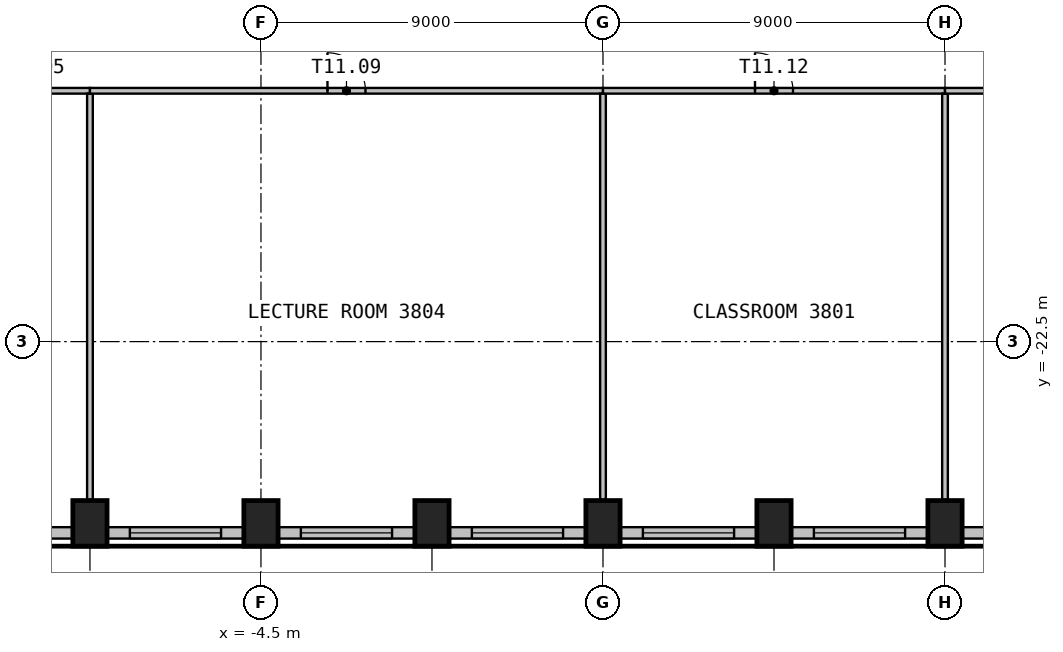
"""IFC4 building model, lengths in metres.
Left out: names, types, materials, properties, quantities, classifications, styles, units other than length and angle.
Written with IfcOpenShell. Run it as: python <this file> out.ifc"""

import sys

from ifc_helpers import new_model, si_unit, direction, frame, frame_2d, origin, origin_2d, place, context, subcontext, project, spatial, rectangle, extrude, element, fill, save


model = new_model("IFC4")
c1 = context("Model", 3, precision=1e-05, world=origin(), true_north=direction((0.0, 1.0)))
c2 = subcontext(c1, "Body", "Model", "MODEL_VIEW")
j1 = project(units=[si_unit("LENGTHUNIT", "METRE"), si_unit("PLANEANGLEUNIT", "RADIAN")], contexts=[c1])
p1 = place(None, origin())
s1 = spatial("IfcSite", under=j1, at=p1, CompositionType="ELEMENT")
p2 = place(p1, origin())
s2 = spatial("IfcBuilding", under=s1, at=p2, CompositionType="ELEMENT")
p3 = place(p2, frame((0.0, 0.0, 156.0)))
s3 = spatial("IfcBuildingStorey", under=s2, at=p3, CompositionType="ELEMENT", Elevation=156.0)
for number, where, z_axis, x_axis in (
    (1, (-9.0, -27.283, 0.0), (0.0, 0.0, 1.0), (1.0, 0.0, 0.0)),
    (2, (-4.5, -27.283, 0.0), (0.0, 0.0, 1.0), (1.0, 0.0, 0.0)),
    (3, (0.0, -27.283, 0.0), (0.0, 0.0, 1.0), (1.0, 0.0, 0.0)),
    (4, (4.5, -27.283, 0.0), (0.0, 0.0, 1.0), (1.0, 0.0, 0.0)),
    (5, (9.0, -27.283, 0.0), (0.0, 0.0, 1.0), (1.0, 0.0, 0.0)),
    (6, (13.5, -27.283, 0.0), (0.0, 0.0, 1.0), (1.0, 0.0, 0.0)),
):
    element("IfcColumn", number, at=place(p3, frame(where, z_axis=z_axis, x_axis=x_axis)), inside=s3, PredefinedType="COLUMN", context=c2, shape_type="SweptSolid", body=[
        extrude(rectangle(XDim=0.9, YDim=1.2, at=origin_2d()), origin(), (0.0, 0.0, 1.0), 3.575),
    ])
p4 = place(p3, frame((-13.05, -27.533, 0.0), z_axis=(0.0, 0.0, 1.0), x_axis=(1.0, 0.0, 0.0)))
e7 = element("IfcWall", 7, at=p4, inside=s3, PredefinedType="SOLIDWALL", context=c2, shape_type="SweptSolid", body=[
    extrude(rectangle(XDim=3.599, YDim=0.3, at=frame_2d((1.8, 0.0))), origin(), (0.0, 0.0, 1.0), 3.575),
])
p5 = place(p4, frame((0.6, 0.0, 0.9)))
e8 = element("IfcOpeningElement", 8, at=p5, cuts=e7, PredefinedType="OPENING", context=c2, shape_type="SweptSolid", body=[
    extrude(rectangle(XDim=2.4, YDim=2.1, at=frame_2d((1.2, 1.05))), frame((0.0, 0.16, 0.0), z_axis=(0.0, -1.0, 0.0), x_axis=(1.0, 0.0, 0.0)), (0.0, 0.0, 1.0), 0.32),
])
p6 = place(p3, frame((-8.55, -27.533, 0.0), z_axis=(0.0, 0.0, 1.0), x_axis=(1.0, 0.0, 0.0)))
e9 = element("IfcWall", 9, at=p6, inside=s3, PredefinedType="SOLIDWALL", context=c2, shape_type="SweptSolid", body=[
    extrude(rectangle(XDim=3.599, YDim=0.3, at=frame_2d((1.8, 0.0))), origin(), (0.0, 0.0, 1.0), 3.575),
])
p7 = place(p6, frame((0.6, 0.0, 0.9)))
e10 = element("IfcOpeningElement", 10, at=p7, cuts=e9, PredefinedType="OPENING", context=c2, shape_type="SweptSolid", body=[
    extrude(rectangle(XDim=2.4, YDim=2.1, at=frame_2d((1.2, 1.05))), frame((0.0, 0.16, 0.0), z_axis=(0.0, -1.0, 0.0), x_axis=(1.0, 0.0, 0.0)), (0.0, 0.0, 1.0), 0.32),
])
p8 = place(p3, frame((-4.05, -27.533, 0.0), z_axis=(0.0, 0.0, 1.0), x_axis=(1.0, 0.0, 0.0)))
e11 = element("IfcWall", 11, at=p8, inside=s3, PredefinedType="SOLIDWALL", context=c2, shape_type="SweptSolid", body=[
    extrude(rectangle(XDim=3.599, YDim=0.3, at=frame_2d((1.8, 0.0))), origin(), (0.0, 0.0, 1.0), 3.575),
])
p9 = place(p8, frame((0.6, 0.0, 0.9)))
e12 = element("IfcOpeningElement", 12, at=p9, cuts=e11, PredefinedType="OPENING", context=c2, shape_type="SweptSolid", body=[
    extrude(rectangle(XDim=2.4, YDim=2.1, at=frame_2d((1.2, 1.05))), frame((0.0, 0.16, 0.0), z_axis=(0.0, -1.0, 0.0), x_axis=(1.0, 0.0, 0.0)), (0.0, 0.0, 1.0), 0.32),
])
p10 = place(p3, frame((0.45, -27.533, 0.0), z_axis=(0.0, 0.0, 1.0), x_axis=(1.0, 0.0, 0.0)))
e13 = element("IfcWall", 13, at=p10, inside=s3, PredefinedType="SOLIDWALL", context=c2, shape_type="SweptSolid", body=[
    extrude(rectangle(XDim=3.599, YDim=0.3, at=frame_2d((1.8, 0.0))), origin(), (0.0, 0.0, 1.0), 3.575),
])
p11 = place(p10, frame((0.6, 0.0, 0.9)))
e14 = element("IfcOpeningElement", 14, at=p11, cuts=e13, PredefinedType="OPENING", context=c2, shape_type="SweptSolid", body=[
    extrude(rectangle(XDim=2.4, YDim=2.1, at=frame_2d((1.2, 1.05))), frame((0.0, 0.16, 0.0), z_axis=(0.0, -1.0, 0.0), x_axis=(1.0, 0.0, 0.0)), (0.0, 0.0, 1.0), 0.32),
])
p12 = place(p3, frame((4.95, -27.533, 0.0), z_axis=(0.0, 0.0, 1.0), x_axis=(1.0, 0.0, 0.0)))
e15 = element("IfcWall", 15, at=p12, inside=s3, PredefinedType="SOLIDWALL", context=c2, shape_type="SweptSolid", body=[
    extrude(rectangle(XDim=3.599, YDim=0.3, at=frame_2d((1.8, 0.0))), origin(), (0.0, 0.0, 1.0), 3.575),
])
p13 = place(p12, frame((0.6, 0.0, 0.9)))
e16 = element("IfcOpeningElement", 16, at=p13, cuts=e15, PredefinedType="OPENING", context=c2, shape_type="SweptSolid", body=[
    extrude(rectangle(XDim=2.4, YDim=2.1, at=frame_2d((1.2, 1.05))), frame((0.0, 0.16, 0.0), z_axis=(0.0, -1.0, 0.0), x_axis=(1.0, 0.0, 0.0)), (0.0, 0.0, 1.0), 0.32),
])
p14 = place(p3, frame((9.45, -27.533, 0.0), z_axis=(0.0, 0.0, 1.0), x_axis=(1.0, 0.0, 0.0)))
e17 = element("IfcWall", 17, at=p14, inside=s3, PredefinedType="SOLIDWALL", context=c2, shape_type="SweptSolid", body=[
    extrude(rectangle(XDim=3.599, YDim=0.3, at=frame_2d((1.8, 0.0))), origin(), (0.0, 0.0, 1.0), 3.575),
])
p15 = place(p14, frame((0.6, 0.0, 0.9)))
e18 = element("IfcOpeningElement", 18, at=p15, cuts=e17, PredefinedType="OPENING", context=c2, shape_type="SweptSolid", body=[
    extrude(rectangle(XDim=2.4, YDim=2.1, at=frame_2d((1.2, 1.05))), frame((0.0, 0.16, 0.0), z_axis=(0.0, -1.0, 0.0), x_axis=(1.0, 0.0, 0.0)), (0.0, 0.0, 1.0), 0.32),
])
p16 = place(p3, frame((13.95, -27.533, 0.0), z_axis=(0.0, 0.0, 1.0), x_axis=(1.0, 0.0, 0.0)))
e19 = element("IfcWall", 19, at=p16, inside=s3, PredefinedType="SOLIDWALL", context=c2, shape_type="SweptSolid", body=[
    extrude(rectangle(XDim=3.294, YDim=0.3, at=frame_2d((1.647, 0.0))), origin(), (0.0, 0.0, 1.0), 3.575),
])
p17 = place(p16, frame((0.6, 0.0, 0.9)))
e20 = element("IfcOpeningElement", 20, at=p17, cuts=e19, PredefinedType="OPENING", context=c2, shape_type="SweptSolid", body=[
    extrude(rectangle(XDim=2.4, YDim=2.1, at=frame_2d((1.2, 1.05))), frame((0.0, 0.16, 0.0), z_axis=(0.0, -1.0, 0.0), x_axis=(1.0, 0.0, 0.0)), (0.0, 0.0, 1.0), 0.32),
])
p18 = place(p3, frame((-12.164, -15.9, 0.0), z_axis=(0.0, 0.0, 1.0), x_axis=(1.0, 0.0, 0.0)))
e21 = element("IfcWall", 21, at=p18, inside=s3, PredefinedType="PARTITIONING", context=c2, shape_type="SweptSolid", body=[
    extrude(rectangle(XDim=3.164, YDim=0.15, at=frame_2d((1.582, 0.0))), origin(), (0.0, 0.0, 1.0), 3.575),
])
p19 = place(p18, frame((1.082, 0.0, 0.0)))
e22 = element("IfcOpeningElement", 22, at=p19, cuts=e21, PredefinedType="OPENING", context=c2, shape_type="SweptSolid", body=[
    extrude(rectangle(XDim=1.0, YDim=2.1, at=frame_2d((0.5, 1.05))), frame((0.0, 0.085, 0.0), z_axis=(0.0, -1.0, 0.0), x_axis=(1.0, 0.0, 0.0)), (0.0, 0.0, 1.0), 0.17),
])
p20 = place(p3, frame((-9.0, -15.975, 0.0), z_axis=(0.0, 0.0, 1.0), x_axis=(0.0, -1.0, 0.0)))
e23 = element("IfcWall", 23, at=p20, inside=s3, PredefinedType="MOVABLE", context=c2, shape_type="SweptSolid", body=[
    extrude(rectangle(XDim=10.688, YDim=0.15, at=frame_2d((5.344, 0.0))), origin(), (0.0, 0.0, 1.0), 3.575),
])
p21 = place(p3, frame((-9.0, -15.9, 0.0), z_axis=(0.0, 0.0, 1.0), x_axis=(1.0, 0.0, 0.0)))
e24 = element("IfcWall", 24, at=p21, inside=s3, PredefinedType="PARTITIONING", context=c2, shape_type="SweptSolid", body=[
    extrude(rectangle(XDim=13.5, YDim=0.15, at=frame_2d((6.75, 0.0))), origin(), (0.0, 0.0, 1.0), 3.575),
])
p22 = place(p21, frame((6.25, 0.0, 0.0)))
e25 = element("IfcOpeningElement", 25, at=p22, cuts=e24, PredefinedType="OPENING", context=c2, shape_type="SweptSolid", body=[
    extrude(rectangle(XDim=1.0, YDim=2.1, at=frame_2d((0.5, 1.05))), frame((0.0, 0.085, 0.0), z_axis=(0.0, -1.0, 0.0), x_axis=(1.0, 0.0, 0.0)), (0.0, 0.0, 1.0), 0.17),
])
p23 = place(p3, frame((4.5, -15.975, 0.0), z_axis=(0.0, 0.0, 1.0), x_axis=(0.0, -1.0, 0.0)))
e26 = element("IfcWall", 26, at=p23, inside=s3, PredefinedType="MOVABLE", context=c2, shape_type="SweptSolid", body=[
    extrude(rectangle(XDim=10.688, YDim=0.15, at=frame_2d((5.344, 0.0))), origin(), (0.0, 0.0, 1.0), 3.575),
])
p24 = place(p3, frame((4.5, -15.9, 0.0), z_axis=(0.0, 0.0, 1.0), x_axis=(1.0, 0.0, 0.0)))
e27 = element("IfcWall", 27, at=p24, inside=s3, PredefinedType="PARTITIONING", context=c2, shape_type="SweptSolid", body=[
    extrude(rectangle(XDim=9.0, YDim=0.15, at=frame_2d((4.5, 0.0))), origin(), (0.0, 0.0, 1.0), 3.575),
])
p25 = place(p24, frame((4.0, 0.0, 0.0)))
e28 = element("IfcOpeningElement", 28, at=p25, cuts=e27, PredefinedType="OPENING", context=c2, shape_type="SweptSolid", body=[
    extrude(rectangle(XDim=1.0, YDim=2.1, at=frame_2d((0.5, 1.05))), frame((0.0, 0.085, 0.0), z_axis=(0.0, -1.0, 0.0), x_axis=(1.0, 0.0, 0.0)), (0.0, 0.0, 1.0), 0.17),
])
p26 = place(p3, frame((13.5, -15.975, 0.0), z_axis=(0.0, 0.0, 1.0), x_axis=(0.0, -1.0, 0.0)))
e29 = element("IfcWall", 29, at=p26, inside=s3, PredefinedType="MOVABLE", context=c2, shape_type="SweptSolid", body=[
    extrude(rectangle(XDim=10.688, YDim=0.15, at=frame_2d((5.344, 0.0))), origin(), (0.0, 0.0, 1.0), 3.575),
])
p27 = place(p3, frame((13.5, -15.9, 0.0), z_axis=(0.0, 0.0, 1.0), x_axis=(1.0, 0.0, 0.0)))
e30 = element("IfcWall", 30, at=p27, inside=s3, PredefinedType="PARTITIONING", context=c2, shape_type="SweptSolid", body=[
    extrude(rectangle(XDim=4.725, YDim=0.15, at=frame_2d((2.363, 0.0))), origin(), (0.0, 0.0, 1.0), 3.575),
])
p28 = place(p27, frame((1.863, 0.0, 0.0)))
e31 = element("IfcOpeningElement", 31, at=p28, cuts=e30, PredefinedType="OPENING", context=c2, shape_type="SweptSolid", body=[
    extrude(rectangle(XDim=1.0, YDim=2.1, at=frame_2d((0.5, 1.05))), frame((0.0, 0.085, 0.0), z_axis=(0.0, -1.0, 0.0), x_axis=(1.0, 0.0, 0.0)), (0.0, 0.0, 1.0), 0.17),
])
p29 = place(p7, origin())
e32 = element("IfcWindow", 32, at=p29, inside=s3, PartitioningType="SINGLE_PANEL", PredefinedType="WINDOW", context=c2, shape_type="SweptSolid", body=[
    extrude(rectangle(XDim=2.4, YDim=2.1, at=frame_2d((1.2, 1.05))), frame((0.0, 0.03, 0.0), z_axis=(0.0, -1.0, 0.0), x_axis=(1.0, 0.0, 0.0)), (0.0, 0.0, 1.0), 0.06),
])
fill(e10, e32)
p30 = place(p9, origin())
e33 = element("IfcWindow", 33, at=p30, inside=s3, PartitioningType="SINGLE_PANEL", PredefinedType="WINDOW", context=c2, shape_type="SweptSolid", body=[
    extrude(rectangle(XDim=2.4, YDim=2.1, at=frame_2d((1.2, 1.05))), frame((0.0, 0.03, 0.0), z_axis=(0.0, -1.0, 0.0), x_axis=(1.0, 0.0, 0.0)), (0.0, 0.0, 1.0), 0.06),
])
fill(e12, e33)
p31 = place(p11, origin())
e34 = element("IfcWindow", 34, at=p31, inside=s3, PartitioningType="SINGLE_PANEL", PredefinedType="WINDOW", context=c2, shape_type="SweptSolid", body=[
    extrude(rectangle(XDim=2.4, YDim=2.1, at=frame_2d((1.2, 1.05))), frame((0.0, 0.03, 0.0), z_axis=(0.0, -1.0, 0.0), x_axis=(1.0, 0.0, 0.0)), (0.0, 0.0, 1.0), 0.06),
])
fill(e14, e34)
p32 = place(p13, origin())
e35 = element("IfcWindow", 35, at=p32, inside=s3, PartitioningType="SINGLE_PANEL", PredefinedType="WINDOW", context=c2, shape_type="SweptSolid", body=[
    extrude(rectangle(XDim=2.4, YDim=2.1, at=frame_2d((1.2, 1.05))), frame((0.0, 0.03, 0.0), z_axis=(0.0, -1.0, 0.0), x_axis=(1.0, 0.0, 0.0)), (0.0, 0.0, 1.0), 0.06),
])
fill(e16, e35)
p33 = place(p15, origin())
e36 = element("IfcWindow", 36, at=p33, inside=s3, PartitioningType="SINGLE_PANEL", PredefinedType="WINDOW", context=c2, shape_type="SweptSolid", body=[
    extrude(rectangle(XDim=2.4, YDim=2.1, at=frame_2d((1.2, 1.05))), frame((0.0, 0.03, 0.0), z_axis=(0.0, -1.0, 0.0), x_axis=(1.0, 0.0, 0.0)), (0.0, 0.0, 1.0), 0.06),
])
fill(e18, e36)
p34 = place(p22, origin())
e37 = element("IfcDoor", 37, at=p34, inside=s3, OperationType="SINGLE_SWING_LEFT", PredefinedType="DOOR", context=c2, shape_type="SweptSolid", body=[
    extrude(rectangle(XDim=1.0, YDim=2.1, at=frame_2d((0.5, 1.05))), frame((0.0, 0.025, 0.0), z_axis=(0.0, -1.0, 0.0), x_axis=(1.0, 0.0, 0.0)), (0.0, 0.0, 1.0), 0.05),
])
fill(e25, e37)
p35 = place(p25, origin())
e38 = element("IfcDoor", 38, at=p35, inside=s3, OperationType="SINGLE_SWING_LEFT", PredefinedType="DOOR", context=c2, shape_type="SweptSolid", body=[
    extrude(rectangle(XDim=1.0, YDim=2.1, at=frame_2d((0.5, 1.05))), frame((0.0, 0.025, 0.0), z_axis=(0.0, -1.0, 0.0), x_axis=(1.0, 0.0, 0.0)), (0.0, 0.0, 1.0), 0.05),
])
fill(e28, e38)
save(model, sys.argv[1])
